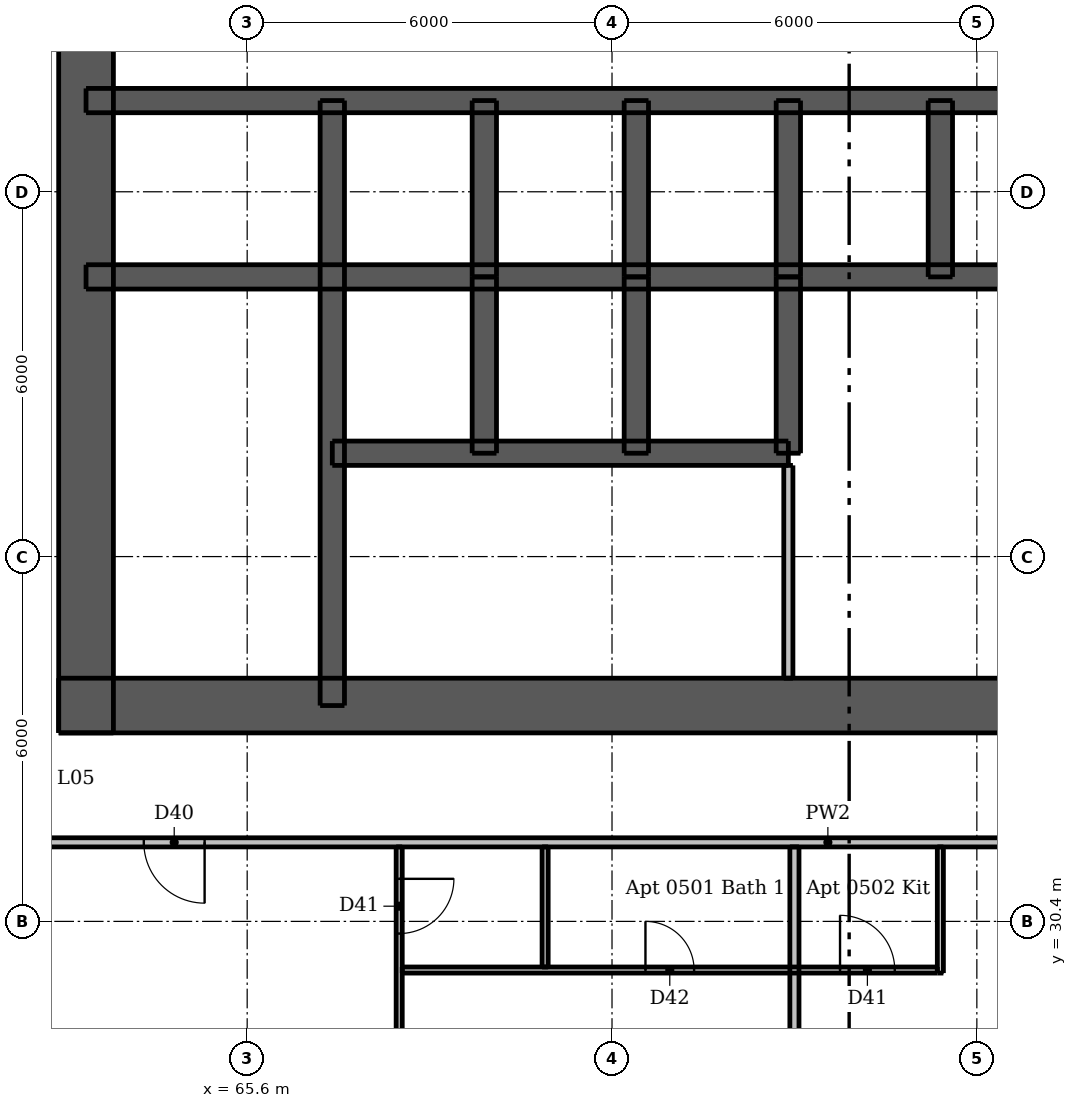
"""IFC4 building model, lengths in metres.
Left out: names, types, materials, properties, quantities, classifications, styles, units other than length and angle.
Written with IfcOpenShell. Run it as: python <this file> out.ifc"""

import sys

from ifc_helpers import new_model, si_unit, direction, frame, frame_2d, origin, place, context, subcontext, project, spatial, rectangle, extrude, element, fill, save


model = new_model("IFC4")
c1 = context("Model", 3, precision=1e-05, world=origin(), true_north=direction((0.0, 1.0)))
c2 = subcontext(c1, "Body", "Model", "MODEL_VIEW")
j1 = project(units=[si_unit("LENGTHUNIT", "METRE"), si_unit("PLANEANGLEUNIT", "RADIAN")], contexts=[c1])
p1 = place(None, origin())
s1 = spatial("IfcSite", under=j1, at=p1, CompositionType="ELEMENT")
p2 = place(p1, origin())
s2 = spatial("IfcBuilding", under=s1, at=p2, CompositionType="ELEMENT")
p3 = place(p2, frame((0.0, 0.0, 23.5)))
s3 = spatial("IfcBuildingStorey", under=s2, at=p3, CompositionType="ELEMENT", Elevation=23.5)
p4 = place(p3, frame((62.5, 33.95, 0.0), z_axis=(0.0, 0.0, 1.0), x_axis=(1.0, 0.0, 0.0)))
e1 = element("IfcWall", 1, at=p4, inside=s3, PredefinedType="SHEAR", context=c2, shape_type="SweptSolid", body=[
    extrude(rectangle(XDim=24.0, YDim=0.9, at=frame_2d((12.0, 0.0))), origin(), (0.0, 0.0, 1.0), 3.05),
])
p5 = place(p4, frame((2.05, 0.0, 0.0)))
e2 = element("IfcOpeningElement", 2, at=p5, cuts=e1, PredefinedType="OPENING", context=c2, shape_type="SweptSolid", body=[
    extrude(rectangle(XDim=1.1, YDim=2.1, at=frame_2d((0.55, 1.05))), frame((0.0, 0.46, 0.0), z_axis=(0.0, -1.0, 0.0), x_axis=(1.0, 0.0, 0.0)), (0.0, 0.0, 1.0), 0.92),
])
p6 = place(p4, frame((20.85, 0.0, 0.0)))
e3 = element("IfcOpeningElement", 3, at=p6, cuts=e1, PredefinedType="OPENING", context=c2, shape_type="SweptSolid", body=[
    extrude(rectangle(XDim=1.1, YDim=2.1, at=frame_2d((0.55, 1.05))), frame((0.0, 0.46, 0.0), z_axis=(0.0, -1.0, 0.0), x_axis=(1.0, 0.0, 0.0)), (0.0, 0.0, 1.0), 0.92),
])
p7 = place(p4, frame((8.0, 0.0, 0.0)))
e4 = element("IfcOpeningElement", 4, at=p7, cuts=e1, PredefinedType="OPENING", context=c2, shape_type="SweptSolid", body=[
    extrude(rectangle(XDim=1.1, YDim=2.1, at=frame_2d((0.55, 1.05))), frame((0.0, 0.46, 0.0), z_axis=(0.0, -1.0, 0.0), x_axis=(1.0, 0.0, 0.0)), (0.0, 0.0, 1.0), 0.92),
])
p8 = place(p4, frame((15.3, 0.0, 0.0)))
e5 = element("IfcOpeningElement", 5, at=p8, cuts=e1, PredefinedType="OPENING", context=c2, shape_type="SweptSolid", body=[
    extrude(rectangle(XDim=0.9, YDim=2.1, at=frame_2d((0.45, 1.05))), frame((0.0, 0.46, 0.0), z_axis=(0.0, -1.0, 0.0), x_axis=(1.0, 0.0, 0.0)), (0.0, 0.0, 1.0), 0.92),
])
p9 = place(p3, frame((62.95, 33.5, 0.0), z_axis=(0.0, 0.0, 1.0), x_axis=(0.0, 1.0, 0.0)))
e6 = element("IfcWall", 6, at=p9, inside=s3, PredefinedType="SHEAR", context=c2, shape_type="SweptSolid", body=[
    extrude(rectangle(XDim=24.0, YDim=0.9, at=frame_2d((12.0, 0.0))), origin(), (0.0, 0.0, 1.0), 3.05),
])
p10 = place(p9, frame((11.2, 0.0, 0.0)))
e7 = element("IfcOpeningElement", 7, at=p10, cuts=e6, PredefinedType="OPENING", context=c2, shape_type="SweptSolid", body=[
    extrude(rectangle(XDim=1.6, YDim=2.1, at=frame_2d((0.8, 1.05))), frame((0.0, 0.46, 0.0), z_axis=(0.0, -1.0, 0.0), x_axis=(1.0, 0.0, 0.0)), (0.0, 0.0, 1.0), 0.92),
])
p11 = place(p3, frame((62.95, 41.0, 0.0), z_axis=(0.0, 0.0, 1.0), x_axis=(1.0, 0.0, 0.0)))
e8 = element("IfcWall", 8, at=p11, inside=s3, PredefinedType="SHEAR", context=c2, shape_type="SweptSolid", body=[
    extrude(rectangle(XDim=23.1, YDim=0.4, at=frame_2d((11.55, 0.0))), origin(), (0.0, 0.0, 1.0), 3.05),
])
p12 = place(p3, frame((62.95, 43.9, 0.0), z_axis=(0.0, 0.0, 1.0), x_axis=(1.0, 0.0, 0.0)))
e9 = element("IfcWall", 9, at=p12, inside=s3, PredefinedType="SHEAR", context=c2, shape_type="SweptSolid", body=[
    extrude(rectangle(XDim=23.1, YDim=0.4, at=frame_2d((11.55, 0.0))), origin(), (0.0, 0.0, 1.0), 3.05),
])
p13 = place(p12, frame((1.7, 0.0, 0.0)))
e10 = element("IfcOpeningElement", 10, at=p13, cuts=e9, PredefinedType="OPENING", context=c2, shape_type="SweptSolid", body=[
    extrude(rectangle(XDim=0.9, YDim=2.1, at=frame_2d((0.45, 1.05))), frame((0.0, 0.21, 0.0), z_axis=(0.0, -1.0, 0.0), x_axis=(1.0, 0.0, 0.0)), (0.0, 0.0, 1.0), 0.42),
])
p14 = place(p12, frame((20.5, 0.0, 0.0)))
e11 = element("IfcOpeningElement", 11, at=p14, cuts=e9, PredefinedType="OPENING", context=c2, shape_type="SweptSolid", body=[
    extrude(rectangle(XDim=0.9, YDim=2.1, at=frame_2d((0.45, 1.05))), frame((0.0, 0.21, 0.0), z_axis=(0.0, -1.0, 0.0), x_axis=(1.0, 0.0, 0.0)), (0.0, 0.0, 1.0), 0.42),
])
p15 = place(p12, frame((4.75, 0.0, 0.0)))
e12 = element("IfcOpeningElement", 12, at=p15, cuts=e9, PredefinedType="OPENING", context=c2, shape_type="SweptSolid", body=[
    extrude(rectangle(XDim=1.1, YDim=2.1, at=frame_2d((0.55, 1.05))), frame((0.0, 0.21, 0.0), z_axis=(0.0, -1.0, 0.0), x_axis=(1.0, 0.0, 0.0)), (0.0, 0.0, 1.0), 0.42),
])
p16 = place(p12, frame((7.25, 0.0, 0.0)))
e13 = element("IfcOpeningElement", 13, at=p16, cuts=e9, PredefinedType="OPENING", context=c2, shape_type="SweptSolid", body=[
    extrude(rectangle(XDim=1.1, YDim=2.1, at=frame_2d((0.55, 1.05))), frame((0.0, 0.21, 0.0), z_axis=(0.0, -1.0, 0.0), x_axis=(1.0, 0.0, 0.0)), (0.0, 0.0, 1.0), 0.42),
])
p17 = place(p12, frame((9.75, 0.0, 0.0)))
e14 = element("IfcOpeningElement", 14, at=p17, cuts=e9, PredefinedType="OPENING", context=c2, shape_type="SweptSolid", body=[
    extrude(rectangle(XDim=1.1, YDim=2.1, at=frame_2d((0.55, 1.05))), frame((0.0, 0.21, 0.0), z_axis=(0.0, -1.0, 0.0), x_axis=(1.0, 0.0, 0.0)), (0.0, 0.0, 1.0), 0.42),
])
p18 = place(p12, frame((12.25, 0.0, 0.0)))
e15 = element("IfcOpeningElement", 15, at=p18, cuts=e9, PredefinedType="OPENING", context=c2, shape_type="SweptSolid", body=[
    extrude(rectangle(XDim=1.1, YDim=2.1, at=frame_2d((0.55, 1.05))), frame((0.0, 0.21, 0.0), z_axis=(0.0, -1.0, 0.0), x_axis=(1.0, 0.0, 0.0)), (0.0, 0.0, 1.0), 0.42),
])
p19 = place(p12, frame((14.75, 0.0, 0.0)))
e16 = element("IfcOpeningElement", 16, at=p19, cuts=e9, PredefinedType="OPENING", context=c2, shape_type="SweptSolid", body=[
    extrude(rectangle(XDim=1.1, YDim=2.1, at=frame_2d((0.55, 1.05))), frame((0.0, 0.21, 0.0), z_axis=(0.0, -1.0, 0.0), x_axis=(1.0, 0.0, 0.0)), (0.0, 0.0, 1.0), 0.42),
])
p20 = place(p12, frame((17.25, 0.0, 0.0)))
e17 = element("IfcOpeningElement", 17, at=p20, cuts=e9, PredefinedType="OPENING", context=c2, shape_type="SweptSolid", body=[
    extrude(rectangle(XDim=1.1, YDim=2.1, at=frame_2d((0.55, 1.05))), frame((0.0, 0.21, 0.0), z_axis=(0.0, -1.0, 0.0), x_axis=(1.0, 0.0, 0.0)), (0.0, 0.0, 1.0), 0.42),
])
p21 = place(p3, frame((67.0, 33.95, 0.0), z_axis=(0.0, 0.0, 1.0), x_axis=(0.0, 1.0, 0.0)))
e18 = element("IfcWall", 18, at=p21, inside=s3, PredefinedType="SHEAR", context=c2, shape_type="SweptSolid", body=[
    extrude(rectangle(XDim=9.95, YDim=0.4, at=frame_2d((4.975, 0.0))), origin(), (0.0, 0.0, 1.0), 3.05),
])
p22 = place(p21, frame((0.65, 0.0, 0.0)))
e19 = element("IfcOpeningElement", 19, at=p22, cuts=e18, PredefinedType="OPENING", context=c2, shape_type="SweptSolid", body=[
    extrude(rectangle(XDim=1.1, YDim=2.1, at=frame_2d((0.55, 1.05))), frame((0.0, 0.21, 0.0), z_axis=(0.0, -1.0, 0.0), x_axis=(1.0, 0.0, 0.0)), (0.0, 0.0, 1.0), 0.42),
])
for number, where, z_axis, x_axis in (
    (20, (69.5, 41.0, 0.0), (0.0, 0.0, 1.0), (0.0, 1.0, 0.0)),
    (21, (72.0, 41.0, 0.0), (0.0, 0.0, 1.0), (0.0, 1.0, 0.0)),
    (22, (74.5, 41.0, 0.0), (0.0, 0.0, 1.0), (0.0, 1.0, 0.0)),
    (23, (77.0, 41.0, 0.0), (0.0, 0.0, 1.0), (0.0, 1.0, 0.0)),
):
    element("IfcWall", number, at=place(p3, frame(where, z_axis=z_axis, x_axis=x_axis)), inside=s3, PredefinedType="SHEAR", context=c2, shape_type="SweptSolid", body=[
        extrude(rectangle(XDim=2.9, YDim=0.4, at=frame_2d((1.45, 0.0))), origin(), (0.0, 0.0, 1.0), 3.05),
    ])
p23 = place(p3, frame((67.0, 38.1, 0.0), z_axis=(0.0, 0.0, 1.0), x_axis=(1.0, 0.0, 0.0)))
e24 = element("IfcWall", 24, at=p23, inside=s3, PredefinedType="SHEAR", context=c2, shape_type="SweptSolid", body=[
    extrude(rectangle(XDim=7.5, YDim=0.4, at=frame_2d((3.75, 0.0))), origin(), (0.0, 0.0, 1.0), 3.05),
])
p24 = place(p23, frame((0.7, 0.0, 0.0)))
e25 = element("IfcOpeningElement", 25, at=p24, cuts=e24, PredefinedType="OPENING", context=c2, shape_type="SweptSolid", body=[
    extrude(rectangle(XDim=1.1, YDim=2.1, at=frame_2d((0.55, 1.05))), frame((0.0, 0.21, 0.0), z_axis=(0.0, -1.0, 0.0), x_axis=(1.0, 0.0, 0.0)), (0.0, 0.0, 1.0), 0.42),
])
p25 = place(p23, frame((3.2, 0.0, 0.0)))
e26 = element("IfcOpeningElement", 26, at=p25, cuts=e24, PredefinedType="OPENING", context=c2, shape_type="SweptSolid", body=[
    extrude(rectangle(XDim=1.1, YDim=2.1, at=frame_2d((0.55, 1.05))), frame((0.0, 0.21, 0.0), z_axis=(0.0, -1.0, 0.0), x_axis=(1.0, 0.0, 0.0)), (0.0, 0.0, 1.0), 0.42),
])
p26 = place(p23, frame((5.65, 0.0, 0.0)))
e27 = element("IfcOpeningElement", 27, at=p26, cuts=e24, PredefinedType="OPENING", context=c2, shape_type="SweptSolid", body=[
    extrude(rectangle(XDim=1.2, YDim=2.1, at=frame_2d((0.6, 1.05))), frame((0.0, 0.21, 0.0), z_axis=(0.0, -1.0, 0.0), x_axis=(1.0, 0.0, 0.0)), (0.0, 0.0, 1.0), 0.42),
])
for number, where, z_axis, x_axis in (
    (28, (69.5, 38.1, 0.0), (0.0, 0.0, 1.0), (0.0, 1.0, 0.0)),
    (29, (72.0, 38.1, 0.0), (0.0, 0.0, 1.0), (0.0, 1.0, 0.0)),
    (30, (74.5, 38.1, 0.0), (0.0, 0.0, 1.0), (0.0, 1.0, 0.0)),
):
    element("IfcWall", number, at=place(p3, frame(where, z_axis=z_axis, x_axis=x_axis)), inside=s3, PredefinedType="SHEAR", context=c2, shape_type="SweptSolid", body=[
        extrude(rectangle(XDim=2.9, YDim=0.4, at=frame_2d((1.45, 0.0))), origin(), (0.0, 0.0, 1.0), 3.05),
    ])
p27 = place(p3, frame((74.5, 34.4, 0.0), z_axis=(0.0, 0.0, 1.0), x_axis=(0.0, 1.0, 0.0)))
e31 = element("IfcWall", 31, at=p27, inside=s3, PredefinedType="PLUMBINGWALL", context=c2, shape_type="SweptSolid", body=[
    extrude(rectangle(XDim=3.5, YDim=0.15, at=frame_2d((1.75, 0.0))), origin(), (0.0, 0.0, 1.0), 3.05),
])
p28 = place(p3, frame((68.1, 31.625, 0.0), z_axis=(0.0, 0.0, 1.0), x_axis=(0.0, -1.0, 0.0)))
e32 = element("IfcWall", 32, at=p28, inside=s3, PredefinedType="PARTITIONING", context=c2, shape_type="SweptSolid", body=[
    extrude(rectangle(XDim=10.125, YDim=0.1, at=frame_2d((5.062, 0.0))), origin(), (0.0, 0.0, 1.0), 3.05),
])
p29 = place(p28, frame((0.525, 0.0, 0.0)))
e33 = element("IfcOpeningElement", 33, at=p29, cuts=e32, PredefinedType="OPENING", context=c2, shape_type="SweptSolid", body=[
    extrude(rectangle(XDim=0.9, YDim=2.1, at=frame_2d((0.45, 1.05))), frame((0.0, 0.06, 0.0), z_axis=(0.0, -1.0, 0.0), x_axis=(1.0, 0.0, 0.0)), (0.0, 0.0, 1.0), 0.12),
])
p30 = place(p28, frame((5.625, 0.0, 0.0)))
e34 = element("IfcOpeningElement", 34, at=p30, cuts=e32, PredefinedType="OPENING", context=c2, shape_type="SweptSolid", body=[
    extrude(rectangle(XDim=0.9, YDim=2.1, at=frame_2d((0.45, 1.05))), frame((0.0, 0.06, 0.0), z_axis=(0.0, -1.0, 0.0), x_axis=(1.0, 0.0, 0.0)), (0.0, 0.0, 1.0), 0.12),
])
p31 = place(p3, frame((70.5, 29.65, 0.0), z_axis=(0.0, 0.0, 1.0), x_axis=(0.0, 1.0, 0.0)))
e35 = element("IfcWall", 35, at=p31, inside=s3, PredefinedType="PARTITIONING", context=c2, shape_type="SweptSolid", body=[
    extrude(rectangle(XDim=1.975, YDim=0.1, at=frame_2d((0.988, 0.0))), origin(), (0.0, 0.0, 1.0), 3.05),
])
p32 = place(p3, frame((77.0, 29.55, 0.0), z_axis=(0.0, 0.0, 1.0), x_axis=(0.0, 1.0, 0.0)))
e36 = element("IfcWall", 36, at=p32, inside=s3, PredefinedType="PARTITIONING", context=c2, shape_type="SweptSolid", body=[
    extrude(rectangle(XDim=2.075, YDim=0.1, at=frame_2d((1.038, 0.0))), origin(), (0.0, 0.0, 1.0), 3.05),
])
p33 = place(p3, frame((68.15, 29.6, 0.0), z_axis=(0.0, 0.0, 1.0), x_axis=(1.0, 0.0, 0.0)))
e37 = element("IfcWall", 37, at=p33, inside=s3, PredefinedType="PARTITIONING", context=c2, shape_type="SweptSolid", body=[
    extrude(rectangle(XDim=8.8, YDim=0.1, at=frame_2d((4.4, 0.0))), origin(), (0.0, 0.0, 1.0), 3.05),
])
p34 = place(p33, frame((4.0, 0.0, 0.0)))
e38 = element("IfcOpeningElement", 38, at=p34, cuts=e37, PredefinedType="OPENING", context=c2, shape_type="SweptSolid", body=[
    extrude(rectangle(XDim=0.8, YDim=2.1, at=frame_2d((0.4, 1.05))), frame((0.0, 0.06, 0.0), z_axis=(0.0, -1.0, 0.0), x_axis=(1.0, 0.0, 0.0)), (0.0, 0.0, 1.0), 0.12),
])
p35 = place(p33, frame((7.2, 0.0, 0.0)))
e39 = element("IfcOpeningElement", 39, at=p35, cuts=e37, PredefinedType="OPENING", context=c2, shape_type="SweptSolid", body=[
    extrude(rectangle(XDim=0.9, YDim=2.1, at=frame_2d((0.45, 1.05))), frame((0.0, 0.06, 0.0), z_axis=(0.0, -1.0, 0.0), x_axis=(1.0, 0.0, 0.0)), (0.0, 0.0, 1.0), 0.12),
])
p36 = place(p3, frame((74.6, 21.5, 0.0), z_axis=(0.0, 0.0, 1.0), x_axis=(0.0, 1.0, 0.0)))
e40 = element("IfcWall", 40, at=p36, inside=s3, PredefinedType="PARTITIONING", context=c2, shape_type="SweptSolid", body=[
    extrude(rectangle(XDim=10.125, YDim=0.15, at=frame_2d((5.062, 0.0))), origin(), (0.0, 0.0, 1.0), 3.05),
])
p37 = place(p3, frame((89.525, 31.7, 0.0), z_axis=(0.0, 0.0, 1.0), x_axis=(-1.0, 0.0, 0.0)))
e41 = element("IfcWall", 41, at=p37, inside=s3, PredefinedType="PARTITIONING", context=c2, shape_type="SweptSolid", body=[
    extrude(rectangle(XDim=28.75, YDim=0.15, at=frame_2d((14.375, 0.0))), origin(), (0.0, 0.0, 1.0), 3.05),
])
p38 = place(p37, frame((24.625, 0.0, 0.0)))
e42 = element("IfcOpeningElement", 42, at=p38, cuts=e41, PredefinedType="OPENING", context=c2, shape_type="SweptSolid", body=[
    extrude(rectangle(XDim=1.0, YDim=2.1, at=frame_2d((0.5, 1.05))), frame((0.0, 0.085, 0.0), z_axis=(0.0, -1.0, 0.0), x_axis=(1.0, 0.0, 0.0)), (0.0, 0.0, 1.0), 0.17),
])
p39 = place(p37, frame((10.225, 0.0, 0.0)))
e43 = element("IfcOpeningElement", 43, at=p39, cuts=e41, PredefinedType="OPENING", context=c2, shape_type="SweptSolid", body=[
    extrude(rectangle(XDim=1.0, YDim=2.1, at=frame_2d((0.5, 1.05))), frame((0.0, 0.085, 0.0), z_axis=(0.0, -1.0, 0.0), x_axis=(1.0, 0.0, 0.0)), (0.0, 0.0, 1.0), 0.17),
])
p40 = place(p37, frame((2.425, 0.0, 0.0)))
e44 = element("IfcOpeningElement", 44, at=p40, cuts=e41, PredefinedType="OPENING", context=c2, shape_type="SweptSolid", body=[
    extrude(rectangle(XDim=1.0, YDim=2.1, at=frame_2d((0.5, 1.05))), frame((0.0, 0.085, 0.0), z_axis=(0.0, -1.0, 0.0), x_axis=(1.0, 0.0, 0.0)), (0.0, 0.0, 1.0), 0.17),
])
p41 = place(p5, origin())
e45 = element("IfcDoor", 45, at=p41, inside=s3, OperationType="SINGLE_SWING_LEFT", PredefinedType="DOOR", context=c2, shape_type="SweptSolid", body=[
    extrude(rectangle(XDim=1.1, YDim=2.1, at=frame_2d((0.55, 1.05))), frame((0.0, 0.438, 0.0), z_axis=(0.0, -1.0, 0.0), x_axis=(1.0, 0.0, 0.0)), (0.0, 0.0, 1.0), 0.05),
])
fill(e2, e45)
p42 = place(p7, origin())
e46 = element("IfcDoor", 46, at=p42, inside=s3, OperationType="SINGLE_SWING_LEFT", PredefinedType="DOOR", context=c2, shape_type="SweptSolid", body=[
    extrude(rectangle(XDim=1.1, YDim=2.1, at=frame_2d((0.55, 1.05))), frame((0.0, 0.438, 0.0), z_axis=(0.0, -1.0, 0.0), x_axis=(1.0, 0.0, 0.0)), (0.0, 0.0, 1.0), 0.05),
])
fill(e4, e46)
p43 = place(p22, origin())
e47 = element("IfcDoor", 47, at=p43, inside=s3, OperationType="SINGLE_SWING_RIGHT", PredefinedType="DOOR", context=c2, shape_type="SweptSolid", body=[
    extrude(rectangle(XDim=1.1, YDim=2.1, at=frame_2d((0.55, 1.05))), frame((0.0, -0.138, 0.0), z_axis=(0.0, -1.0, 0.0), x_axis=(1.0, 0.0, 0.0)), (0.0, 0.0, 1.0), 0.05),
])
fill(e19, e47)
p44 = place(p8, origin())
e48 = element("IfcDoor", 48, at=p44, inside=s3, OperationType="SINGLE_SWING_LEFT", PredefinedType="DOOR", context=c2, shape_type="SweptSolid", body=[
    extrude(rectangle(XDim=0.9, YDim=2.1, at=frame_2d((0.45, 1.05))), frame((0.0, 0.438, 0.0), z_axis=(0.0, -1.0, 0.0), x_axis=(1.0, 0.0, 0.0)), (0.0, 0.0, 1.0), 0.05),
])
fill(e5, e48)
p45 = place(p13, origin())
e49 = element("IfcDoor", 49, at=p45, inside=s3, OperationType="SINGLE_SWING_LEFT", PredefinedType="DOOR", context=c2, shape_type="SweptSolid", body=[
    extrude(rectangle(XDim=0.9, YDim=2.1, at=frame_2d((0.45, 1.05))), frame((0.0, -0.138, 0.0), z_axis=(0.0, -1.0, 0.0), x_axis=(1.0, 0.0, 0.0)), (0.0, 0.0, 1.0), 0.05),
])
fill(e10, e49)
p46 = place(p15, origin())
e50 = element("IfcDoor", 50, at=p46, inside=s3, OperationType="DOUBLE_DOOR_SLIDING", PredefinedType="DOOR", context=c2, shape_type="SweptSolid", body=[
    extrude(rectangle(XDim=1.1, YDim=2.1, at=frame_2d((0.55, 1.05))), frame((0.0, 0.025, 0.0), z_axis=(0.0, -1.0, 0.0), x_axis=(1.0, 0.0, 0.0)), (0.0, 0.0, 1.0), 0.05),
])
fill(e12, e50)
p47 = place(p16, origin())
e51 = element("IfcDoor", 51, at=p47, inside=s3, OperationType="DOUBLE_DOOR_SLIDING", PredefinedType="DOOR", context=c2, shape_type="SweptSolid", body=[
    extrude(rectangle(XDim=1.1, YDim=2.1, at=frame_2d((0.55, 1.05))), frame((0.0, 0.025, 0.0), z_axis=(0.0, -1.0, 0.0), x_axis=(1.0, 0.0, 0.0)), (0.0, 0.0, 1.0), 0.05),
])
fill(e13, e51)
p48 = place(p17, origin())
e52 = element("IfcDoor", 52, at=p48, inside=s3, OperationType="DOUBLE_DOOR_SLIDING", PredefinedType="DOOR", context=c2, shape_type="SweptSolid", body=[
    extrude(rectangle(XDim=1.1, YDim=2.1, at=frame_2d((0.55, 1.05))), frame((0.0, 0.025, 0.0), z_axis=(0.0, -1.0, 0.0), x_axis=(1.0, 0.0, 0.0)), (0.0, 0.0, 1.0), 0.05),
])
fill(e14, e52)
p49 = place(p18, origin())
e53 = element("IfcDoor", 53, at=p49, inside=s3, OperationType="DOUBLE_DOOR_SLIDING", PredefinedType="DOOR", context=c2, shape_type="SweptSolid", body=[
    extrude(rectangle(XDim=1.1, YDim=2.1, at=frame_2d((0.55, 1.05))), frame((0.0, 0.025, 0.0), z_axis=(0.0, -1.0, 0.0), x_axis=(1.0, 0.0, 0.0)), (0.0, 0.0, 1.0), 0.05),
])
fill(e15, e53)
p50 = place(p19, origin())
e54 = element("IfcDoor", 54, at=p50, inside=s3, OperationType="DOUBLE_DOOR_SLIDING", PredefinedType="DOOR", context=c2, shape_type="SweptSolid", body=[
    extrude(rectangle(XDim=1.1, YDim=2.1, at=frame_2d((0.55, 1.05))), frame((0.0, 0.025, 0.0), z_axis=(0.0, -1.0, 0.0), x_axis=(1.0, 0.0, 0.0)), (0.0, 0.0, 1.0), 0.05),
])
fill(e16, e54)
p51 = place(p24, origin())
e55 = element("IfcDoor", 55, at=p51, inside=s3, OperationType="DOUBLE_DOOR_SLIDING", PredefinedType="DOOR", context=c2, shape_type="SweptSolid", body=[
    extrude(rectangle(XDim=1.1, YDim=2.1, at=frame_2d((0.55, 1.05))), frame((0.0, 0.025, 0.0), z_axis=(0.0, -1.0, 0.0), x_axis=(1.0, 0.0, 0.0)), (0.0, 0.0, 1.0), 0.05),
])
fill(e25, e55)
p52 = place(p25, origin())
e56 = element("IfcDoor", 56, at=p52, inside=s3, OperationType="DOUBLE_DOOR_SLIDING", PredefinedType="DOOR", context=c2, shape_type="SweptSolid", body=[
    extrude(rectangle(XDim=1.1, YDim=2.1, at=frame_2d((0.55, 1.05))), frame((0.0, 0.025, 0.0), z_axis=(0.0, -1.0, 0.0), x_axis=(1.0, 0.0, 0.0)), (0.0, 0.0, 1.0), 0.05),
])
fill(e26, e56)
p53 = place(p26, origin())
e57 = element("IfcDoor", 57, at=p53, inside=s3, OperationType="DOUBLE_DOOR_SLIDING", PredefinedType="DOOR", context=c2, shape_type="SweptSolid", body=[
    extrude(rectangle(XDim=1.2, YDim=2.1, at=frame_2d((0.6, 1.05))), frame((0.0, 0.025, 0.0), z_axis=(0.0, -1.0, 0.0), x_axis=(1.0, 0.0, 0.0)), (0.0, 0.0, 1.0), 0.05),
])
fill(e27, e57)
p54 = place(p38, origin())
e58 = element("IfcDoor", 58, at=p54, inside=s3, OperationType="SINGLE_SWING_LEFT", PredefinedType="DOOR", context=c2, shape_type="SweptSolid", body=[
    extrude(rectangle(XDim=1.0, YDim=2.1, at=frame_2d((0.5, 1.05))), frame((0.0, 0.025, 0.0), z_axis=(0.0, -1.0, 0.0), x_axis=(1.0, 0.0, 0.0)), (0.0, 0.0, 1.0), 0.05),
])
fill(e42, e58)
p55 = place(p29, origin())
e59 = element("IfcDoor", 59, at=p55, inside=s3, OperationType="SINGLE_SWING_LEFT", PredefinedType="DOOR", context=c2, shape_type="SweptSolid", body=[
    extrude(rectangle(XDim=0.9, YDim=2.1, at=frame_2d((0.45, 1.05))), frame((0.0, 0.025, 0.0), z_axis=(0.0, -1.0, 0.0), x_axis=(1.0, 0.0, 0.0)), (0.0, 0.0, 1.0), 0.05),
])
fill(e33, e59)
p56 = place(p34, origin())
e60 = element("IfcDoor", 60, at=p56, inside=s3, OperationType="SINGLE_SWING_LEFT", PredefinedType="DOOR", context=c2, shape_type="SweptSolid", body=[
    extrude(rectangle(XDim=0.8, YDim=2.1, at=frame_2d((0.4, 1.05))), frame((0.0, 0.025, 0.0), z_axis=(0.0, -1.0, 0.0), x_axis=(1.0, 0.0, 0.0)), (0.0, 0.0, 1.0), 0.05),
])
fill(e38, e60)
p57 = place(p35, origin())
e61 = element("IfcDoor", 61, at=p57, inside=s3, OperationType="SINGLE_SWING_LEFT", PredefinedType="DOOR", context=c2, shape_type="SweptSolid", body=[
    extrude(rectangle(XDim=0.9, YDim=2.1, at=frame_2d((0.45, 1.05))), frame((0.0, 0.025, 0.0), z_axis=(0.0, -1.0, 0.0), x_axis=(1.0, 0.0, 0.0)), (0.0, 0.0, 1.0), 0.05),
])
fill(e39, e61)
save(model, sys.argv[1])
